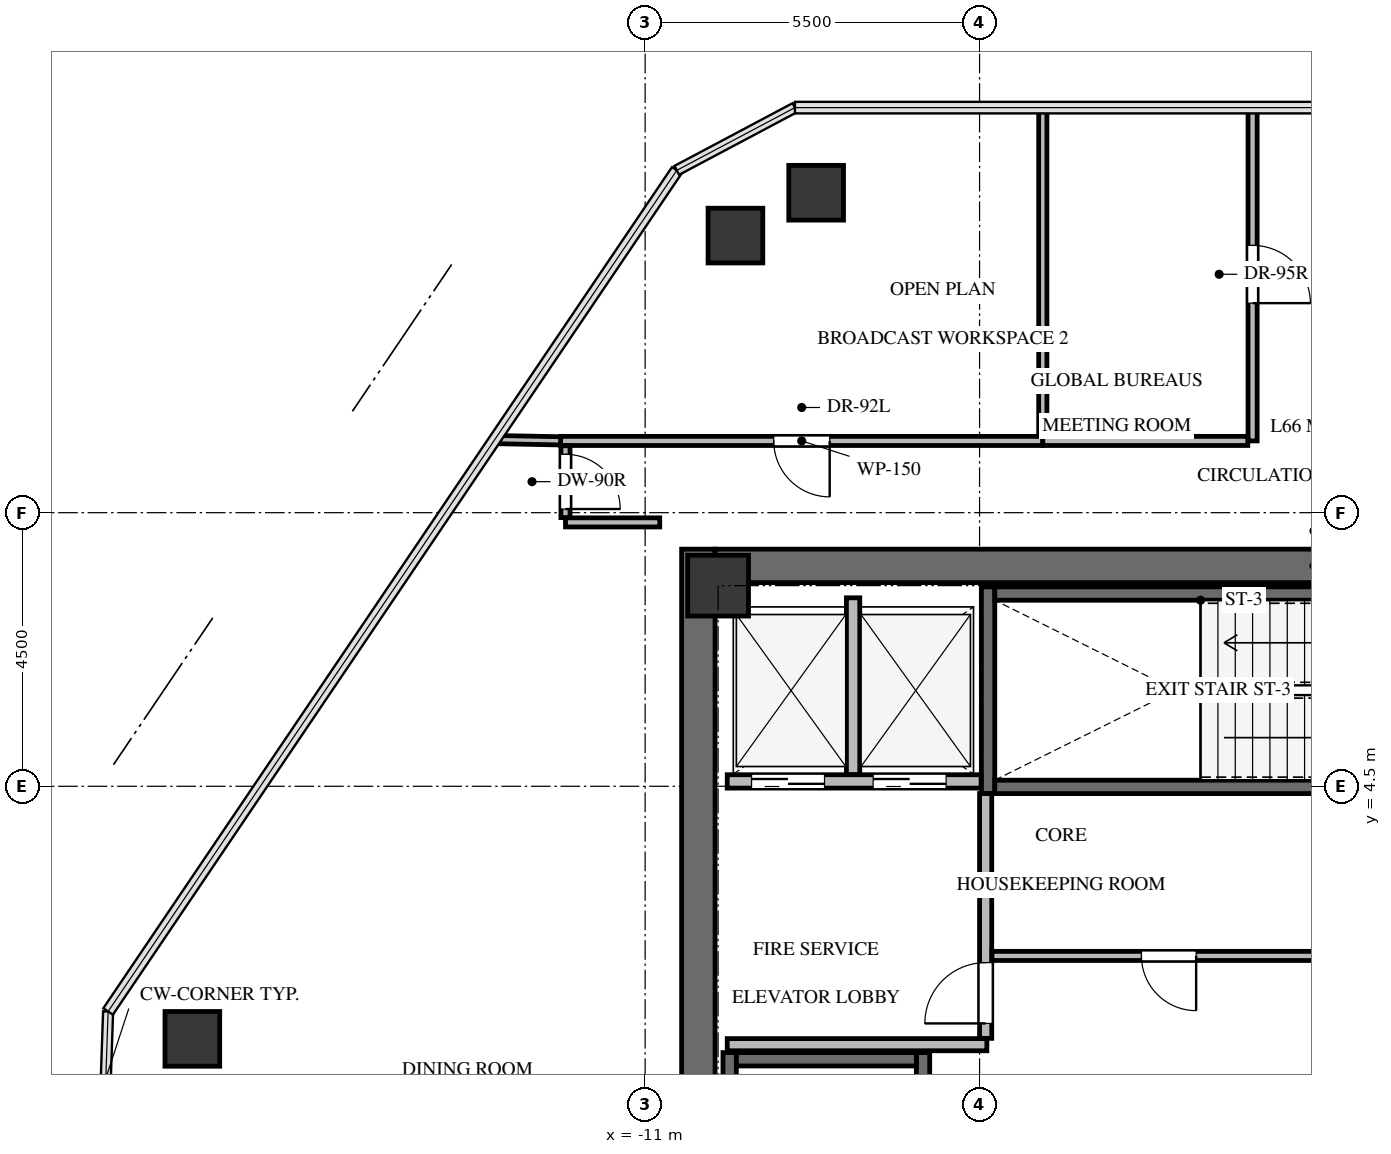
"""IFC4 building model, lengths in metres.
Left out: names, types, materials, properties, quantities, classifications, styles, units other than length and angle.
Written with IfcOpenShell. Run it as: python <this file> out.ifc"""

import sys

from ifc_helpers import new_model, si_unit, direction, frame, frame_2d, origin, origin_2d, place, context, subcontext, project, spatial, rectangle, extrude, source, transform, mapped, element, fill, save


model = new_model("IFC4")
c1 = context("Model", 3, precision=1e-05, world=origin(), true_north=direction((0.0, 1.0)))
c2 = subcontext(c1, "Body", "Model", "MODEL_VIEW")
j1 = project(units=[si_unit("LENGTHUNIT", "METRE"), si_unit("PLANEANGLEUNIT", "RADIAN")], contexts=[c1])
p1 = place(None, origin())
s1 = spatial("IfcSite", under=j1, at=p1, CompositionType="ELEMENT")
p2 = place(p1, origin())
s2 = spatial("IfcBuilding", under=s1, at=p2, CompositionType="ELEMENT")
p3 = place(p2, frame((0.0, 0.0, 238.1)))
s3 = spatial("IfcBuildingStorey", under=s2, at=p3, CompositionType="ELEMENT", Elevation=238.1)
p4 = place(p3, frame((-10.125, -8.4, 0.0), z_axis=(0.0, 0.0, 1.0), x_axis=(0.0, 1.0, 0.0)))
e1 = element("IfcWall", 1, at=p4, inside=s3, PredefinedType="SHEAR", context=c2, shape_type="SweptSolid", body=[
    extrude(rectangle(XDim=16.8, YDim=0.55, at=frame_2d((8.4, 0.0))), origin(), (0.0, 0.0, 1.0), 3.3),
])
p5 = place(p3, frame((-9.85, 8.125, 0.0), z_axis=(0.0, 0.0, 1.0), x_axis=(1.0, 0.0, 0.0)))
e2 = element("IfcWall", 2, at=p5, inside=s3, PredefinedType="SHEAR", context=c2, shape_type="SweptSolid", body=[
    extrude(rectangle(XDim=19.7, YDim=0.55, at=frame_2d((9.85, 0.0))), origin(), (0.0, 0.0, 1.0), 3.3),
])
p6 = place(p3, frame((-6.43, -7.77, -0.24), z_axis=(0.0, 0.0, 1.0), x_axis=(0.0, 1.0, 0.0)))
e3 = element("IfcWall", 3, at=p6, inside=s3, PredefinedType="SHEAR", context=c2, shape_type="SweptSolid", body=[
    extrude(rectangle(XDim=7.89, YDim=0.22, at=frame_2d((3.945, 0.0))), origin(), (0.0, 0.0, 1.0), 3.3),
])
p7 = place(p6, frame((6.32, 0.0, 0.0)))
e4 = element("IfcOpeningElement", 4, at=p7, cuts=e3, PredefinedType="OPENING", context=c2, shape_type="SweptSolid", body=[
    extrude(rectangle(XDim=1.05, YDim=2.15, at=frame_2d((0.525, 1.075))), frame((0.0, 0.12, 0.0), z_axis=(0.0, -1.0, 0.0), x_axis=(1.0, 0.0, 0.0)), (0.0, 0.0, 1.0), 0.24),
])
p8 = place(p3, frame((-9.61, 0.12, -0.24), z_axis=(0.0, 0.0, 1.0), x_axis=(0.0, -1.0, 0.0)))
e5 = element("IfcWall", 5, at=p8, inside=s3, PredefinedType="SHEAR", context=c2, shape_type="SweptSolid", body=[
    extrude(rectangle(XDim=7.89, YDim=0.22, at=frame_2d((3.945, 0.0))), origin(), (0.0, 0.0, 1.0), 3.3),
])
p9 = place(p3, frame((-6.54, 0.01, -0.24), z_axis=(0.0, 0.0, 1.0), x_axis=(-1.0, 0.0, 0.0)))
e6 = element("IfcWall", 6, at=p9, inside=s3, PredefinedType="SHEAR", context=c2, shape_type="SweptSolid", body=[
    extrude(rectangle(XDim=2.96, YDim=0.22, at=frame_2d((1.48, 0.0))), origin(), (0.0, 0.0, 1.0), 3.3),
])
p10 = place(p3, frame((-5.36, 7.78, -0.24), z_axis=(0.0, 0.0, 1.0), x_axis=(0.0, -1.0, 0.0)))
e7 = element("IfcWall", 7, at=p10, inside=s3, PredefinedType="SHEAR", context=c2, shape_type="SweptSolid", body=[
    extrude(rectangle(XDim=3.4, YDim=0.22, at=frame_2d((1.7, 0.0))), origin(), (0.0, 0.0, 1.0), 3.3),
])
p11 = place(p3, frame((-5.25, 4.49, -0.24), z_axis=(0.0, 0.0, 1.0), x_axis=(1.0, 0.0, 0.0)))
e8 = element("IfcWall", 8, at=p11, inside=s3, PredefinedType="SHEAR", context=c2, shape_type="SweptSolid", body=[
    extrude(rectangle(XDim=7.35, YDim=0.22, at=frame_2d((3.675, 0.0))), origin(), (0.0, 0.0, 1.0), 3.3),
])
p12 = place(p11, frame((5.85, 0.0, 0.0)))
e9 = element("IfcOpeningElement", 9, at=p12, cuts=e8, PredefinedType="OPENING", context=c2, shape_type="SweptSolid", body=[
    extrude(rectangle(XDim=1.05, YDim=2.15, at=frame_2d((0.525, 1.075))), frame((0.0, 0.12, 0.0), z_axis=(0.0, -1.0, 0.0), x_axis=(1.0, 0.0, 0.0)), (0.0, 0.0, 1.0), 0.24),
])
p13 = place(p3, frame((2.1, 7.67, -0.24), z_axis=(0.0, 0.0, 1.0), x_axis=(-1.0, 0.0, 0.0)))
e10 = element("IfcWall", 10, at=p13, inside=s3, PredefinedType="SHEAR", context=c2, shape_type="SweptSolid", body=[
    extrude(rectangle(XDim=7.35, YDim=0.22, at=frame_2d((3.675, 0.0))), origin(), (0.0, 0.0, 1.0), 3.3),
])
m1 = source(origin(), c2, "Body", "SweptSolid", [
    extrude(rectangle(XDim=1.0, YDim=1.0, at=origin_2d()), origin(), (0.0, 0.0, 1.0), 3.3),
])
p14 = place(p3, frame((-9.8, 7.8, -0.24), z_axis=(0.0, 0.0, 1.0), x_axis=(1.0, 0.0, 0.0)))
e11 = element("IfcColumn", 11, at=p14, inside=s3, PredefinedType="COLUMN", context=c2, shape_type="MappedRepresentation", body=[
    mapped(m1, transform((0.0, 0.0, 0.0), x_axis=(1.0, 0.0, 0.0), y_axis=(0.0, 1.0, 0.0), z_axis=(0.0, 0.0, 1.0), scale=1.0)),
])
m2 = source(origin(), c2, "Body", "SweptSolid", [
    extrude(rectangle(XDim=0.9, YDim=0.9, at=origin_2d()), origin(), (0.0, 0.0, 1.0), 3.3),
])
for number, where, z_axis, x_axis in (
    (12, (-18.446, 0.346, -0.24), (0.0, 0.0, 1.0), (1.0, 0.0, 0.0)),
    (13, (-9.515, 13.557, -0.24), (0.0, 0.0, 1.0), (1.0, 0.0, 0.0)),
    (14, (-8.188, 14.262, -0.24), (0.0, 0.0, 1.0), (1.0, 0.0, 0.0)),
):
    element("IfcColumn", number, at=place(p3, frame(where, z_axis=z_axis, x_axis=x_axis)), inside=s3, PredefinedType="COLUMN", context=c2, shape_type="MappedRepresentation", body=[
        mapped(m2, transform((0.0, 0.0, 0.0), x_axis=(1.0, 0.0, 0.0), y_axis=(0.0, 1.0, 0.0), z_axis=(0.0, 0.0, 1.0), scale=1.0)),
    ])
p15 = place(p3, frame((-9.65, 4.58, 0.0), z_axis=(0.0, 0.0, 1.0), x_axis=(1.0, 0.0, 0.0)))
e15 = element("IfcWall", 15, at=p15, inside=s3, PredefinedType="SOLIDWALL", context=c2, shape_type="SweptSolid", body=[
    extrude(rectangle(XDim=4.175, YDim=0.22, at=frame_2d((2.087, 0.0))), origin(), (0.0, 0.0, 1.0), 3.045),
])
p16 = place(p15, frame((0.4, 0.0, 0.0)))
e16 = element("IfcOpeningElement", 16, at=p16, cuts=e15, PredefinedType="OPENING", context=c2, shape_type="SweptSolid", body=[
    extrude(rectangle(XDim=1.2, YDim=2.15, at=frame_2d((0.6, 1.075))), frame((0.0, 0.12, 0.0), z_axis=(0.0, -1.0, 0.0), x_axis=(1.0, 0.0, 0.0)), (0.0, 0.0, 1.0), 0.24),
])
p17 = place(p15, frame((2.4, 0.0, 0.0)))
e17 = element("IfcOpeningElement", 17, at=p17, cuts=e15, PredefinedType="OPENING", context=c2, shape_type="SweptSolid", body=[
    extrude(rectangle(XDim=1.2, YDim=2.15, at=frame_2d((0.6, 1.075))), frame((0.0, 0.12, 0.0), z_axis=(0.0, -1.0, 0.0), x_axis=(1.0, 0.0, 0.0)), (0.0, 0.0, 1.0), 0.24),
])
p18 = place(p3, frame((-7.58, 4.694, 0.0), z_axis=(0.0, 0.0, 1.0), x_axis=(0.0, 1.0, 0.0)))
e18 = element("IfcWall", 18, at=p18, inside=s3, PredefinedType="SOLIDWALL", context=c2, shape_type="SweptSolid", body=[
    extrude(rectangle(XDim=2.906, YDim=0.22, at=frame_2d((1.453, 0.0))), origin(), (0.0, 0.0, 1.0), 3.045),
])
p19 = place(p3, frame((-9.65, 0.25, 0.0), z_axis=(0.0, 0.0, 1.0), x_axis=(1.0, 0.0, 0.0)))
e19 = element("IfcWall", 19, at=p19, inside=s3, PredefinedType="SOLIDWALL", context=c2, shape_type="SweptSolid", body=[
    extrude(rectangle(XDim=4.27, YDim=0.2, at=frame_2d((2.135, 0.0))), origin(), (0.0, 0.0, 1.0), 3.045),
])
p20 = place(p3, frame((-5.4, 0.354, 0.0), z_axis=(0.0, 0.0, 1.0), x_axis=(0.0, 1.0, 0.0)))
e20 = element("IfcWall", 20, at=p20, inside=s3, PredefinedType="SOLIDWALL", context=c2, shape_type="SweptSolid", body=[
    extrude(rectangle(XDim=4.026, YDim=0.2, at=frame_2d((2.013, 0.0))), origin(), (0.0, 0.0, 1.0), 3.045),
])
p21 = place(p20, frame((0.246, 0.0, 0.0)))
e21 = element("IfcOpeningElement", 21, at=p21, cuts=e20, PredefinedType="OPENING", context=c2, shape_type="SweptSolid", body=[
    extrude(rectangle(XDim=1.0, YDim=2.15, at=frame_2d((0.5, 1.075))), frame((0.0, 0.11, 0.0), z_axis=(0.0, -1.0, 0.0), x_axis=(1.0, 0.0, 0.0)), (0.0, 0.0, 1.0), 0.22),
])
p22 = place(p3, frame((0.52, 1.71, 0.0), z_axis=(0.0, 0.0, 1.0), x_axis=(-1.0, 0.0, 0.0)))
e22 = element("IfcWall", 22, at=p22, inside=s3, PredefinedType="PARTITIONING", context=c2, shape_type="SweptSolid", body=[
    extrude(rectangle(XDim=5.816, YDim=0.15, at=frame_2d((2.908, 0.0))), origin(), (0.0, 0.0, 1.0), 3.045),
])
p23 = place(p22, frame((2.458, 0.0, 0.0)))
e23 = element("IfcOpeningElement", 23, at=p23, cuts=e22, PredefinedType="OPENING", context=c2, shape_type="SweptSolid", body=[
    extrude(rectangle(XDim=0.9, YDim=2.05, at=frame_2d((0.45, 1.025))), frame((0.0, 0.085, 0.0), z_axis=(0.0, -1.0, 0.0), x_axis=(1.0, 0.0, 0.0)), (0.0, 0.0, 1.0), 0.17),
])
p24 = place(p3, frame((-4.46, 10.18, 0.0), z_axis=(0.0, 0.0, 1.0), x_axis=(-1.0, 0.0, 0.0)))
e24 = element("IfcWall", 24, at=p24, inside=s3, PredefinedType="PARTITIONING", context=c2, shape_type="SweptSolid", body=[
    extrude(rectangle(XDim=7.93, YDim=0.15, at=frame_2d((3.965, 0.0))), origin(), (0.0, 0.0, 1.0), 2.301),
])
p25 = place(p24, frame((3.505, 0.0, 0.0)))
e25 = element("IfcOpeningElement", 25, at=p25, cuts=e24, PredefinedType="OPENING", context=c2, shape_type="SweptSolid", body=[
    extrude(rectangle(XDim=0.92, YDim=2.1, at=frame_2d((0.46, 1.05))), frame((0.0, 0.085, 0.0), z_axis=(0.0, -1.0, 0.0), x_axis=(1.0, 0.0, 0.0)), (0.0, 0.0, 1.0), 0.17),
])
p26 = place(p3, frame((-1.01, 15.662, 0.0), z_axis=(0.0, 0.0, 1.0), x_axis=(0.0, -1.0, 0.0)))
e26 = element("IfcWall", 26, at=p26, inside=s3, PredefinedType="PARTITIONING", context=c2, shape_type="SweptSolid", body=[
    extrude(rectangle(XDim=5.482, YDim=0.15, at=frame_2d((2.741, 0.0))), origin(), (0.0, 0.0, 1.0), 2.399),
])
p27 = place(p26, frame((2.266, 0.0, 0.0)))
e27 = element("IfcOpeningElement", 27, at=p27, cuts=e26, PredefinedType="OPENING", context=c2, shape_type="SweptSolid", body=[
    extrude(rectangle(XDim=0.95, YDim=2.1, at=frame_2d((0.475, 1.05))), frame((0.0, 0.085, 0.0), z_axis=(0.0, -1.0, 0.0), x_axis=(1.0, 0.0, 0.0)), (0.0, 0.0, 1.0), 0.17),
])
p28 = place(p3, frame((-1.089, 10.18, 0.0), z_axis=(0.0, 0.0, 1.0), x_axis=(-1.0, 0.0, 0.0)))
e28 = element("IfcWall", 28, at=p28, inside=s3, PredefinedType="PARTITIONING", context=c2, shape_type="SweptSolid", body=[
    extrude(rectangle(XDim=3.371, YDim=0.15, at=frame_2d((1.686, 0.0))), origin(), (0.0, 0.0, 1.0), 3.045),
])
p29 = place(p3, frame((-12.31, 8.84, 0.0), z_axis=(0.0, 0.0, 1.0), x_axis=(1.0, 0.0, 0.0)))
e29 = element("IfcWall", 29, at=p29, inside=s3, PredefinedType="PARTITIONING", context=c2, shape_type="SweptSolid", body=[
    extrude(rectangle(XDim=1.55, YDim=0.15, at=frame_2d((0.775, 0.0))), origin(), (0.0, 0.0, 1.0), 3.045),
])
p30 = place(p3, frame((-12.31, 10.101, 0.0), z_axis=(0.0, 0.0, 1.0), x_axis=(0.0, -1.0, 0.0)))
e30 = element("IfcWall", 30, at=p30, inside=s3, PredefinedType="PARTITIONING", context=c2, shape_type="SweptSolid", body=[
    extrude(rectangle(XDim=1.182, YDim=0.15, at=frame_2d((0.591, 0.0))), origin(), (0.0, 0.0, 1.0), 2.399),
])
p31 = place(p30, frame((0.141, 0.0, 0.0)))
e31 = element("IfcOpeningElement", 31, at=p31, cuts=e30, PredefinedType="OPENING", context=c2, shape_type="SweptSolid", body=[
    extrude(rectangle(XDim=0.9, YDim=2.05, at=frame_2d((0.45, 1.025))), frame((0.0, 0.085, 0.0), z_axis=(0.0, -1.0, 0.0), x_axis=(1.0, 0.0, 0.0)), (0.0, 0.0, 1.0), 0.17),
])
p32 = place(p3, frame((-4.46, 15.662, 0.0), z_axis=(0.0, 0.0, 1.0), x_axis=(0.0, -1.0, 0.0)))
e32 = element("IfcWall", 32, at=p32, inside=s3, PredefinedType="PARTITIONING", context=c2, shape_type="SweptSolid", body=[
    extrude(rectangle(XDim=5.403, YDim=0.135, at=frame_2d((2.702, 0.0))), origin(), (0.0, 0.0, 1.0), 2.399),
])
p33 = place(p3, frame((-12.39, 10.181, 0.0), z_axis=(0.0, 0.0, 1.0), x_axis=(-0.999812128272, 0.019383192748, 0.0)))
e33 = element("IfcWall", 33, at=p33, inside=s3, PredefinedType="PARTITIONING", context=c2, shape_type="SweptSolid", body=[
    extrude(rectangle(XDim=1.083, YDim=0.135, at=frame_2d((0.542, 0.0))), origin(), (0.0, 0.0, 1.0), 3.045),
])
m3 = source(origin(), c2, "Body", "SweptSolid", [
    extrude(rectangle(XDim=1.2, YDim=2.15, at=frame_2d((0.6, 1.075))), frame((0.0, 0.025, 0.0), z_axis=(0.0, -1.0, 0.0), x_axis=(1.0, 0.0, 0.0)), (0.0, 0.0, 1.0), 0.05),
])
p34 = place(p16, origin())
e34 = element("IfcDoor", 34, at=p34, inside=s3, OperationType="DOUBLE_DOOR_SLIDING", PredefinedType="DOOR", context=c2, shape_type="MappedRepresentation", body=[
    mapped(m3, transform((0.0, 0.0, 0.0), x_axis=(1.0, 0.0, 0.0), y_axis=(0.0, 1.0, 0.0), z_axis=(0.0, 0.0, 1.0), scale=1.0)),
])
fill(e16, e34)
p35 = place(p17, origin())
e35 = element("IfcDoor", 35, at=p35, inside=s3, OperationType="DOUBLE_DOOR_SLIDING", PredefinedType="DOOR", context=c2, shape_type="MappedRepresentation", body=[
    mapped(m3, transform((0.0, 0.0, 0.0), x_axis=(1.0, 0.0, 0.0), y_axis=(0.0, 1.0, 0.0), z_axis=(0.0, 0.0, 1.0), scale=1.0)),
])
fill(e17, e35)
m4 = source(origin(), c2, "Body", "SweptSolid", [
    extrude(rectangle(XDim=1.0, YDim=2.15, at=frame_2d((0.5, 1.075))), frame((0.0, 0.025, 0.0), z_axis=(0.0, -1.0, 0.0), x_axis=(1.0, 0.0, 0.0)), (0.0, 0.0, 1.0), 0.05),
])
p36 = place(p21, origin())
e36 = element("IfcDoor", 36, at=p36, inside=s3, OperationType="SINGLE_SWING_LEFT", PredefinedType="DOOR", context=c2, shape_type="MappedRepresentation", body=[
    mapped(m4, transform((0.0, 0.0, 0.0), x_axis=(1.0, 0.0, 0.0), y_axis=(0.0, 1.0, 0.0), z_axis=(0.0, 0.0, 1.0), scale=1.0)),
])
fill(e21, e36)
m5 = source(origin(), c2, "Body", "SweptSolid", [
    extrude(rectangle(XDim=0.9, YDim=2.05, at=frame_2d((0.45, 1.025))), frame((0.0, 0.025, 0.0), z_axis=(0.0, -1.0, 0.0), x_axis=(1.0, 0.0, 0.0)), (0.0, 0.0, 1.0), 0.05),
])
p37 = place(p23, origin())
e37 = element("IfcDoor", 37, at=p37, inside=s3, OperationType="SINGLE_SWING_LEFT", PredefinedType="DOOR", context=c2, shape_type="MappedRepresentation", body=[
    mapped(m5, transform((0.0, 0.0, 0.0), x_axis=(1.0, 0.0, 0.0), y_axis=(0.0, 1.0, 0.0), z_axis=(0.0, 0.0, 1.0), scale=1.0)),
])
fill(e23, e37)
m6 = source(origin(), c2, "Body", "SweptSolid", [
    extrude(rectangle(XDim=0.92, YDim=2.1, at=frame_2d((0.46, 1.05))), frame((0.0, 0.025, 0.0), z_axis=(0.0, -1.0, 0.0), x_axis=(1.0, 0.0, 0.0)), (0.0, 0.0, 1.0), 0.05),
])
p38 = place(p25, origin())
e38 = element("IfcDoor", 38, at=p38, inside=s3, OperationType="SINGLE_SWING_LEFT", PredefinedType="DOOR", context=c2, shape_type="MappedRepresentation", body=[
    mapped(m6, transform((0.0, 0.0, 0.0), x_axis=(1.0, 0.0, 0.0), y_axis=(0.0, 1.0, 0.0), z_axis=(0.0, 0.0, 1.0), scale=1.0)),
])
fill(e25, e38)
m7 = source(origin(), c2, "Body", "SweptSolid", [
    extrude(rectangle(XDim=0.95, YDim=2.1, at=frame_2d((0.475, 1.05))), frame((0.0, 0.025, 0.0), z_axis=(0.0, -1.0, 0.0), x_axis=(1.0, 0.0, 0.0)), (0.0, 0.0, 1.0), 0.05),
])
p39 = place(p27, origin())
e39 = element("IfcDoor", 39, at=p39, inside=s3, OperationType="SINGLE_SWING_RIGHT", PredefinedType="DOOR", context=c2, shape_type="MappedRepresentation", body=[
    mapped(m7, transform((0.0, 0.0, 0.0), x_axis=(1.0, 0.0, 0.0), y_axis=(0.0, 1.0, 0.0), z_axis=(0.0, 0.0, 1.0), scale=1.0)),
])
fill(e27, e39)
m8 = source(origin(), c2, "Body", "SweptSolid", [
    extrude(rectangle(XDim=0.9, YDim=2.05, at=frame_2d((0.45, 1.025))), frame((0.0, 0.025, 0.0), z_axis=(0.0, -1.0, 0.0), x_axis=(1.0, 0.0, 0.0)), (0.0, 0.0, 1.0), 0.05),
])
p40 = place(p31, origin())
e40 = element("IfcDoor", 40, at=p40, inside=s3, OperationType="SINGLE_SWING_RIGHT", PredefinedType="DOOR", context=c2, shape_type="MappedRepresentation", body=[
    mapped(m8, transform((0.0, 0.0, 0.0), x_axis=(1.0, 0.0, 0.0), y_axis=(0.0, 1.0, 0.0), z_axis=(0.0, 0.0, 1.0), scale=1.0)),
])
fill(e31, e40)
save(model, sys.argv[1])
